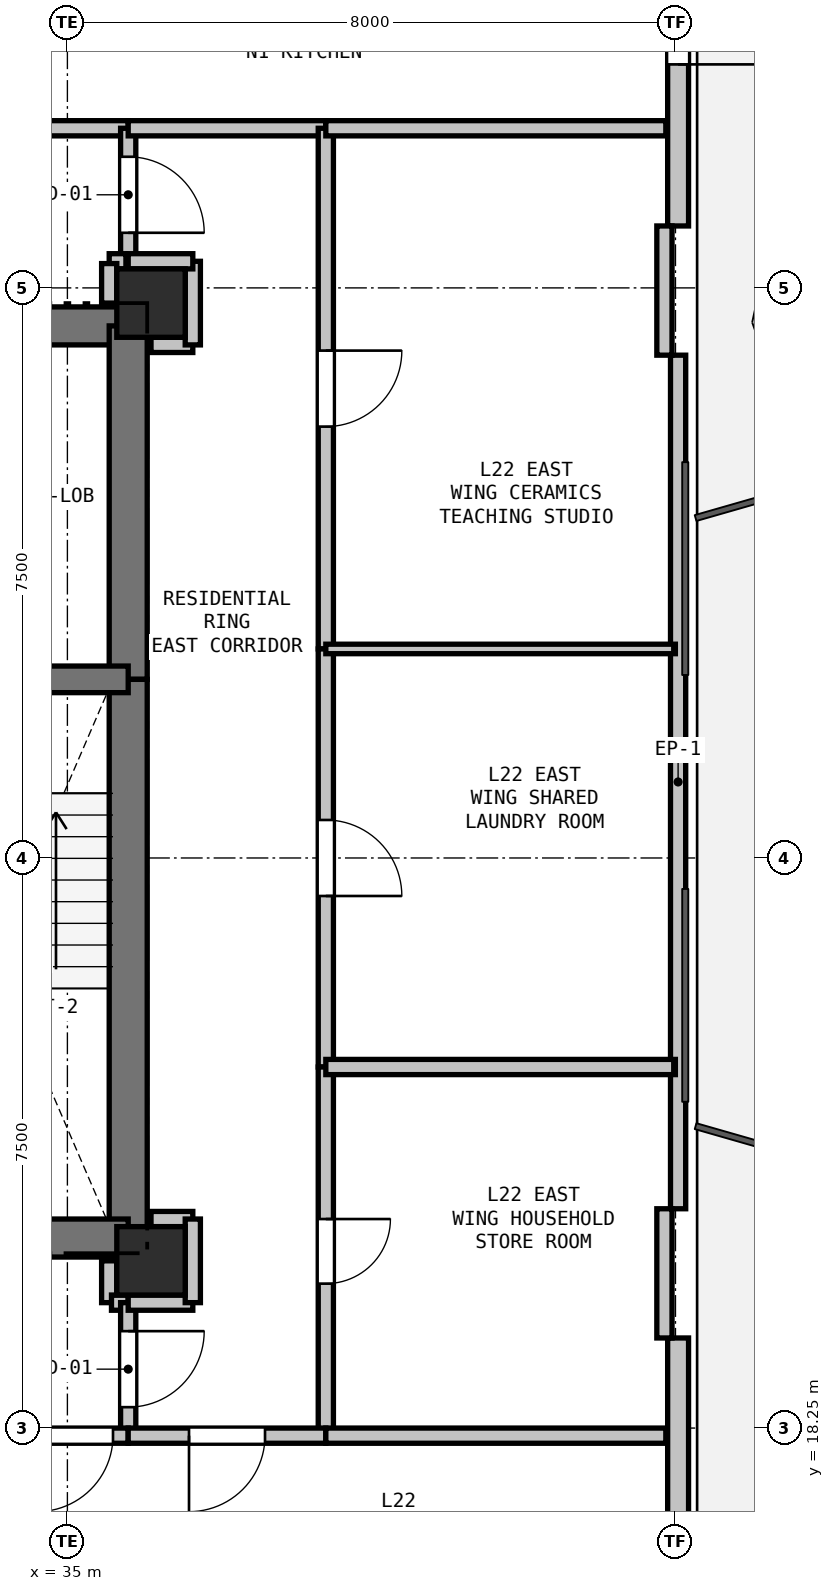
"""IFC4 building model, lengths in metres.
Left out: names, types, materials, properties, quantities, classifications, styles, units other than length and angle.
Written with IfcOpenShell. Run it as: python <this file> out.ifc"""

import sys

from ifc_helpers import new_model, si_unit, direction, frame, frame_2d, origin, origin_2d, place, context, subcontext, project, spatial, rectangle, extrude, element, fill, save


model = new_model("IFC4")
c1 = context("Model", 3, precision=1e-05, world=origin(), true_north=direction((0.0, 1.0)))
c2 = subcontext(c1, "Body", "Model", "MODEL_VIEW")
j1 = project(units=[si_unit("LENGTHUNIT", "METRE"), si_unit("PLANEANGLEUNIT", "RADIAN")], contexts=[c1])
p1 = place(None, origin())
s1 = spatial("IfcSite", under=j1, at=p1, CompositionType="ELEMENT")
p2 = place(p1, origin())
s2 = spatial("IfcBuilding", under=s1, at=p2, CompositionType="ELEMENT")
p3 = place(p2, frame((0.0, 0.0, 83.4)))
s3 = spatial("IfcBuildingStorey", under=s2, at=p3, CompositionType="ELEMENT", Elevation=83.4)
for number, where, z_axis, x_axis in (
    (1, (36.1, 33.05, 0.0), (0.0, 0.0, 1.0), (1.0, 0.0, 0.0)),
    (2, (36.1, 20.45, 0.0), (0.0, 0.0, 1.0), (1.0, 0.0, 0.0)),
):
    element("IfcColumn", number, at=place(p3, frame(where, z_axis=z_axis, x_axis=x_axis)), inside=s3, PredefinedType="COLUMN", context=c2, shape_type="SweptSolid", body=[
        extrude(rectangle(XDim=0.9, YDim=0.9, at=origin_2d()), origin(), (0.0, 0.0, 1.0), 3.3),
    ])
p4 = place(p3, frame((43.035, 45.994, 0.0), z_axis=(0.0, 0.0, 1.0), x_axis=(0.0, -1.0, 0.0)))
e3 = element("IfcWall", 3, at=p4, inside=s3, PredefinedType="SOLIDWALL", context=c2, shape_type="SweptSolid", body=[
    extrude(rectangle(XDim=11.93, YDim=0.275, at=frame_2d((5.965, 0.0))), origin(), (0.0, 0.0, 1.0), 2.67),
])
p5 = place(p4, frame((8.704, 0.0, 0.0)))
e4 = element("IfcOpeningElement", 4, at=p5, cuts=e3, PredefinedType="OPENING", context=c2, shape_type="SweptSolid", body=[
    extrude(rectangle(XDim=1.1, YDim=2.1, at=frame_2d((0.55, 1.05))), frame((0.0, 0.147, 0.0), z_axis=(0.0, -1.0, 0.0), x_axis=(1.0, 0.0, 0.0)), (0.0, 0.0, 1.0), 0.295),
])
p6 = place(p3, frame((43.035, 32.365, 0.0), z_axis=(0.0, 0.0, 1.0), x_axis=(0.0, -1.0, 0.0)))
e5 = element("IfcWall", 5, at=p6, inside=s3, PredefinedType="PARAPET", context=c2, shape_type="SweptSolid", body=[
    extrude(rectangle(XDim=11.229, YDim=0.2, at=frame_2d((5.615, 0.0))), origin(), (0.0, 0.0, 1.0), 0.2),
])
p7 = place(p3, frame((43.035, 19.435, 0.0), z_axis=(0.0, 0.0, 1.0), x_axis=(0.0, -1.0, 0.0)))
e6 = element("IfcWall", 6, at=p7, inside=s3, PredefinedType="SOLIDWALL", context=c2, shape_type="SweptSolid", body=[
    extrude(rectangle(XDim=11.93, YDim=0.275, at=frame_2d((5.965, 0.0))), origin(), (0.0, 0.0, 1.0), 2.67),
])
p8 = place(p7, frame((9.726, 0.0, 0.9)))
e7 = element("IfcOpeningElement", 7, at=p8, cuts=e6, PredefinedType="OPENING", context=c2, shape_type="SweptSolid", body=[
    extrude(rectangle(XDim=1.2, YDim=1.4, at=frame_2d((0.6, 0.7))), frame((0.0, 0.147, 0.0), z_axis=(0.0, -1.0, 0.0), x_axis=(1.0, 0.0, 0.0)), (0.0, 0.0, 1.0), 0.295),
])
for number, where, z_axis, x_axis in (
    (8, (42.854, 34.065, 0.0), (0.0, 0.0, 1.0), (0.0, -1.0, 0.0)),
    (9, (42.854, 21.135, 0.0), (0.0, 0.0, 1.0), (0.0, -1.0, 0.0)),
):
    element("IfcWall", number, at=place(p3, frame(where, z_axis=z_axis, x_axis=x_axis)), inside=s3, PredefinedType="PARAPET", context=c2, shape_type="SweptSolid", body=[
        extrude(rectangle(XDim=1.7, YDim=0.2, at=frame_2d((0.85, 0.0))), origin(), (0.0, 0.0, 1.0), 2.67),
    ])
p9 = place(p3, frame((32.35, 32.75, 0.0), z_axis=(0.0, 0.0, 1.0), x_axis=(1.0, 0.0, 0.0)))
e10 = element("IfcWall", 10, at=p9, inside=s3, PredefinedType="SHEAR", context=c2, shape_type="SweptSolid", body=[
    extrude(rectangle(XDim=3.45, YDim=0.5, at=frame_2d((1.725, 0.0))), origin(), (0.0, 0.0, 1.0), 3.05),
])
p10 = place(p9, frame((0.65, 0.0, 0.0)))
e11 = element("IfcOpeningElement", 11, at=p10, cuts=e10, PredefinedType="OPENING", context=c2, shape_type="SweptSolid", body=[
    extrude(rectangle(XDim=1.15, YDim=2.15, at=frame_2d((0.575, 1.075))), frame((0.0, 0.26, 0.0), z_axis=(0.0, -1.0, 0.0), x_axis=(1.0, 0.0, 0.0)), (0.0, 0.0, 1.0), 0.52),
])
p11 = place(p3, frame((35.8, 32.75, 0.0), z_axis=(0.0, 0.0, 1.0), x_axis=(0.0, -1.0, 0.0)))
e12 = element("IfcWall", 12, at=p11, inside=s3, PredefinedType="SHEAR", context=c2, shape_type="SweptSolid", body=[
    extrude(rectangle(XDim=4.65, YDim=0.5, at=frame_2d((2.325, 0.0))), origin(), (0.0, 0.0, 1.0), 3.05),
])
p12 = place(p3, frame((35.8, 28.1, 0.0), z_axis=(0.0, 0.0, 1.0), x_axis=(0.0, -1.0, 0.0)))
e13 = element("IfcWall", 13, at=p12, inside=s3, PredefinedType="SHEAR", context=c2, shape_type="SweptSolid", body=[
    extrude(rectangle(XDim=7.35, YDim=0.5, at=frame_2d((3.675, 0.0))), origin(), (0.0, 0.0, 1.0), 3.05),
])
p13 = place(p3, frame((35.8, 20.75, 0.0), z_axis=(0.0, 0.0, 1.0), x_axis=(-1.0, 0.0, 0.0)))
e14 = element("IfcWall", 14, at=p13, inside=s3, PredefinedType="SHEAR", context=c2, shape_type="SweptSolid", body=[
    extrude(rectangle(XDim=3.45, YDim=0.5, at=frame_2d((1.725, 0.0))), origin(), (0.0, 0.0, 1.0), 3.05),
])
p14 = place(p3, frame((32.35, 28.1, 0.0), z_axis=(0.0, 0.0, 1.0), x_axis=(1.0, 0.0, 0.0)))
e15 = element("IfcWall", 15, at=p14, inside=s3, PredefinedType="SHEAR", context=c2, shape_type="SweptSolid", body=[
    extrude(rectangle(XDim=3.45, YDim=0.35, at=frame_2d((1.725, 0.0))), origin(), (0.0, 0.0, 1.0), 3.05),
])
p15 = place(p14, frame((1.15, 0.0, 0.0)))
e16 = element("IfcOpeningElement", 16, at=p15, cuts=e15, PredefinedType="OPENING", context=c2, shape_type="SweptSolid", body=[
    extrude(rectangle(XDim=1.15, YDim=2.15, at=frame_2d((0.575, 1.075))), frame((0.0, 0.185, 0.0), z_axis=(0.0, -1.0, 0.0), x_axis=(1.0, 0.0, 0.0)), (0.0, 0.0, 1.0), 0.37),
])
p16 = place(p3, frame((35.55, 20.45, 0.0), z_axis=(0.0, 0.0, 1.0), x_axis=(0.0, -1.0, 0.0)))
e17 = element("IfcWall", 17, at=p16, inside=s3, PredefinedType="PARTITIONING", context=c2, shape_type="SweptSolid", body=[
    extrude(rectangle(XDim=0.55, YDim=0.2, at=frame_2d((0.275, 0.0))), origin(), (0.0, 0.0, 1.0), 2.498),
])
p17 = place(p3, frame((35.58, 19.9, 0.0), z_axis=(0.0, 0.0, 1.0), x_axis=(1.0, 0.0, 0.0)))
e18 = element("IfcWall", 18, at=p17, inside=s3, PredefinedType="PARTITIONING", context=c2, shape_type="SweptSolid", body=[
    extrude(rectangle(XDim=0.22, YDim=0.2, at=frame_2d((0.11, 0.0))), origin(), (0.0, 0.0, 1.0), 3.05),
])
p18 = place(p3, frame((35.8, 19.9, 0.0), z_axis=(0.0, 0.0, 1.0), x_axis=(0.0, -1.0, 0.0)))
e19 = element("IfcWall", 19, at=p18, inside=s3, PredefinedType="PARTITIONING", context=c2, shape_type="SweptSolid", body=[
    extrude(rectangle(XDim=1.75, YDim=0.2, at=frame_2d((0.875, 0.0))), origin(), (0.0, 0.0, 1.0), 3.05),
])
p19 = place(p18, frame((0.375, 0.0, 0.0)))
e20 = element("IfcOpeningElement", 20, at=p19, cuts=e19, PredefinedType="OPENING", context=c2, shape_type="SweptSolid", body=[
    extrude(rectangle(XDim=1.0, YDim=2.15, at=frame_2d((0.5, 1.075))), frame((0.0, 0.11, 0.0), z_axis=(0.0, -1.0, 0.0), x_axis=(1.0, 0.0, 0.0)), (0.0, 0.0, 1.0), 0.22),
])
p20 = place(p3, frame((35.8, 18.15, 0.0), z_axis=(0.0, 0.0, 1.0), x_axis=(-1.0, 0.0, 0.0)))
e21 = element("IfcWall", 21, at=p20, inside=s3, PredefinedType="PARTITIONING", context=c2, shape_type="SweptSolid", body=[
    extrude(rectangle(XDim=1.4, YDim=0.2, at=frame_2d((0.7, 0.0))), origin(), (0.0, 0.0, 1.0), 3.05),
])
p21 = place(p20, frame((0.2, 0.0, 0.0)))
e22 = element("IfcOpeningElement", 22, at=p21, cuts=e21, PredefinedType="OPENING", context=c2, shape_type="SweptSolid", body=[
    extrude(rectangle(XDim=1.0, YDim=2.15, at=frame_2d((0.5, 1.075))), frame((0.0, 0.11, 0.0), z_axis=(0.0, -1.0, 0.0), x_axis=(1.0, 0.0, 0.0)), (0.0, 0.0, 1.0), 0.22),
])
p22 = place(p3, frame((33.2, 35.35, 0.0), z_axis=(0.0, 0.0, 1.0), x_axis=(1.0, 0.0, 0.0)))
e23 = element("IfcWall", 23, at=p22, inside=s3, PredefinedType="PARTITIONING", context=c2, shape_type="SweptSolid", body=[
    extrude(rectangle(XDim=2.6, YDim=0.2, at=frame_2d((1.3, 0.0))), origin(), (0.0, 0.0, 1.0), 3.05),
])
p23 = place(p3, frame((35.8, 35.35, 0.0), z_axis=(0.0, 0.0, 1.0), x_axis=(0.0, -1.0, 0.0)))
e24 = element("IfcWall", 24, at=p23, inside=s3, PredefinedType="PARTITIONING", context=c2, shape_type="SweptSolid", body=[
    extrude(rectangle(XDim=1.75, YDim=0.2, at=frame_2d((0.875, 0.0))), origin(), (0.0, 0.0, 1.0), 3.05),
])
p24 = place(p23, frame((0.375, 0.0, 0.0)))
e25 = element("IfcOpeningElement", 25, at=p24, cuts=e24, PredefinedType="OPENING", context=c2, shape_type="SweptSolid", body=[
    extrude(rectangle(XDim=1.0, YDim=2.15, at=frame_2d((0.5, 1.075))), frame((0.0, 0.11, 0.0), z_axis=(0.0, -1.0, 0.0), x_axis=(1.0, 0.0, 0.0)), (0.0, 0.0, 1.0), 0.22),
])
p25 = place(p3, frame((35.77, 33.6, 0.0), z_axis=(0.0, 0.0, 1.0), x_axis=(-1.0, 0.0, 0.0)))
e26 = element("IfcWall", 26, at=p25, inside=s3, PredefinedType="PARTITIONING", context=c2, shape_type="SweptSolid", body=[
    extrude(rectangle(XDim=0.22, YDim=0.2, at=frame_2d((0.11, 0.0))), origin(), (0.0, 0.0, 1.0), 3.05),
])
p26 = place(p3, frame((35.55, 33.57, 0.0), z_axis=(0.0, 0.0, 1.0), x_axis=(0.0, -1.0, 0.0)))
e27 = element("IfcWall", 27, at=p26, inside=s3, PredefinedType="PARTITIONING", context=c2, shape_type="SweptSolid", body=[
    extrude(rectangle(XDim=0.52, YDim=0.2, at=frame_2d((0.26, 0.0))), origin(), (0.0, 0.0, 1.0), 2.498),
])
for number, where, z_axis, x_axis in (
    (28, (36.65, 21.0, 0.0), (0.0, 0.0, 1.0), (-1.0, 0.0, 0.0)),
    (29, (36.1, 32.5, 0.0), (0.0, 0.0, 1.0), (1.0, 0.0, 0.0)),
):
    element("IfcWall", number, at=place(p3, frame(where, z_axis=z_axis, x_axis=x_axis)), inside=s3, PredefinedType="PARTITIONING", context=c2, shape_type="SweptSolid", body=[
        extrude(rectangle(XDim=0.55, YDim=0.2, at=frame_2d((0.275, 0.0))), origin(), (0.0, 0.0, 1.0), 2.498),
    ])
p27 = place(p3, frame((36.65, 32.5, 0.0), z_axis=(0.0, 0.0, 1.0), x_axis=(0.0, 1.0, 0.0)))
e30 = element("IfcWall", 30, at=p27, inside=s3, PredefinedType="PARTITIONING", context=c2, shape_type="SweptSolid", body=[
    extrude(rectangle(XDim=1.1, YDim=0.2, at=frame_2d((0.55, 0.0))), origin(), (0.0, 0.0, 1.0), 2.423),
])
p28 = place(p3, frame((36.65, 33.6, 0.0), z_axis=(0.0, 0.0, 1.0), x_axis=(-1.0, 0.0, 0.0)))
e31 = element("IfcWall", 31, at=p28, inside=s3, PredefinedType="PARTITIONING", context=c2, shape_type="SweptSolid", body=[
    extrude(rectangle(XDim=0.85, YDim=0.2, at=frame_2d((0.425, 0.0))), origin(), (0.0, 0.0, 1.0), 2.423),
])
p29 = place(p3, frame((35.8, 35.35, 0.0), z_axis=(0.0, 0.0, 1.0), x_axis=(1.0, 0.0, 0.0)))
e32 = element("IfcWall", 32, at=p29, inside=s3, PredefinedType="PARTITIONING", context=c2, shape_type="SweptSolid", body=[
    extrude(rectangle(XDim=2.6, YDim=0.2, at=frame_2d((1.3, 0.0))), origin(), (0.0, 0.0, 1.0), 2.423),
])
p30 = place(p3, frame((38.4, 35.35, 0.0), z_axis=(0.0, 0.0, 1.0), x_axis=(0.0, -1.0, 0.0)))
e33 = element("IfcWall", 33, at=p30, inside=s3, PredefinedType="PARTITIONING", context=c2, shape_type="SweptSolid", body=[
    extrude(rectangle(XDim=6.85, YDim=0.2, at=frame_2d((3.425, 0.0))), origin(), (0.0, 0.0, 1.0), 3.05),
])
p31 = place(p30, frame((2.925, 0.0, 0.0)))
e34 = element("IfcOpeningElement", 34, at=p31, cuts=e33, PredefinedType="OPENING", context=c2, shape_type="SweptSolid", body=[
    extrude(rectangle(XDim=1.0, YDim=2.15, at=frame_2d((0.5, 1.075))), frame((0.0, 0.11, 0.0), z_axis=(0.0, -1.0, 0.0), x_axis=(1.0, 0.0, 0.0)), (0.0, 0.0, 1.0), 0.22),
])
p32 = place(p3, frame((38.4, 28.5, 0.0), z_axis=(0.0, 0.0, 1.0), x_axis=(0.0, -1.0, 0.0)))
e35 = element("IfcWall", 35, at=p32, inside=s3, PredefinedType="PARTITIONING", context=c2, shape_type="SweptSolid", body=[
    extrude(rectangle(XDim=5.5, YDim=0.2, at=frame_2d((2.75, 0.0))), origin(), (0.0, 0.0, 1.0), 3.05),
])
p33 = place(p32, frame((2.25, 0.0, 0.0)))
e36 = element("IfcOpeningElement", 36, at=p33, cuts=e35, PredefinedType="OPENING", context=c2, shape_type="SweptSolid", body=[
    extrude(rectangle(XDim=1.0, YDim=2.15, at=frame_2d((0.5, 1.075))), frame((0.0, 0.11, 0.0), z_axis=(0.0, -1.0, 0.0), x_axis=(1.0, 0.0, 0.0)), (0.0, 0.0, 1.0), 0.22),
])
p34 = place(p3, frame((38.4, 23.0, 0.0), z_axis=(0.0, 0.0, 1.0), x_axis=(0.0, -1.0, 0.0)))
e37 = element("IfcWall", 37, at=p34, inside=s3, PredefinedType="PARTITIONING", context=c2, shape_type="SweptSolid", body=[
    extrude(rectangle(XDim=4.85, YDim=0.2, at=frame_2d((2.425, 0.0))), origin(), (0.0, 0.0, 1.0), 3.05),
])
p35 = place(p34, frame((2.0, 0.0, 0.0)))
e38 = element("IfcOpeningElement", 38, at=p35, cuts=e37, PredefinedType="OPENING", context=c2, shape_type="SweptSolid", body=[
    extrude(rectangle(XDim=0.85, YDim=2.1, at=frame_2d((0.425, 1.05))), frame((0.0, 0.11, 0.0), z_axis=(0.0, -1.0, 0.0), x_axis=(1.0, 0.0, 0.0)), (0.0, 0.0, 1.0), 0.22),
])
p36 = place(p3, frame((38.4, 18.15, 0.0), z_axis=(0.0, 0.0, 1.0), x_axis=(-1.0, 0.0, 0.0)))
e39 = element("IfcWall", 39, at=p36, inside=s3, PredefinedType="PARTITIONING", context=c2, shape_type="SweptSolid", body=[
    extrude(rectangle(XDim=2.6, YDim=0.2, at=frame_2d((1.3, 0.0))), origin(), (0.0, 0.0, 1.0), 2.423),
])
p37 = place(p36, frame((0.8, 0.0, 0.0)))
e40 = element("IfcOpeningElement", 40, at=p37, cuts=e39, PredefinedType="OPENING", context=c2, shape_type="SweptSolid", body=[
    extrude(rectangle(XDim=1.0, YDim=2.15, at=frame_2d((0.5, 1.075))), frame((0.0, 0.11, 0.0), z_axis=(0.0, -1.0, 0.0), x_axis=(1.0, 0.0, 0.0)), (0.0, 0.0, 1.0), 0.22),
])
p38 = place(p3, frame((35.8, 19.9, 0.0), z_axis=(0.0, 0.0, 1.0), x_axis=(1.0, 0.0, 0.0)))
e41 = element("IfcWall", 41, at=p38, inside=s3, PredefinedType="PARTITIONING", context=c2, shape_type="SweptSolid", body=[
    extrude(rectangle(XDim=0.85, YDim=0.2, at=frame_2d((0.425, 0.0))), origin(), (0.0, 0.0, 1.0), 2.423),
])
p39 = place(p3, frame((36.65, 19.9, 0.0), z_axis=(0.0, 0.0, 1.0), x_axis=(0.0, 1.0, 0.0)))
e42 = element("IfcWall", 42, at=p39, inside=s3, PredefinedType="PARTITIONING", context=c2, shape_type="SweptSolid", body=[
    extrude(rectangle(XDim=1.1, YDim=0.2, at=frame_2d((0.55, 0.0))), origin(), (0.0, 0.0, 1.0), 3.05),
])
for number, where, z_axis, x_axis in (
    (43, (42.873, 35.35, 0.0), (0.0, 0.0, 1.0), (-1.0, 0.0, 0.0)),
    (44, (38.4, 18.15, 0.0), (0.0, 0.0, 1.0), (1.0, 0.0, 0.0)),
):
    element("IfcWall", number, at=place(p3, frame(where, z_axis=z_axis, x_axis=x_axis)), inside=s3, PredefinedType="PARTITIONING", context=c2, shape_type="SweptSolid", body=[
        extrude(rectangle(XDim=4.473, YDim=0.2, at=frame_2d((2.237, 0.0))), origin(), (0.0, 0.0, 1.0), 2.365),
    ])
p40 = place(p3, frame((42.999, 28.5, 0.0), z_axis=(0.0, 0.0, 1.0), x_axis=(-1.0, 0.0, 0.0)))
e45 = element("IfcWall", 45, at=p40, inside=s3, PredefinedType="PARTITIONING", context=c2, shape_type="SweptSolid", body=[
    extrude(rectangle(XDim=4.599, YDim=0.125, at=frame_2d((2.299, 0.0))), origin(), (0.0, 0.0, 1.0), 2.365),
])
p41 = place(p3, frame((42.999, 23.0, 0.0), z_axis=(0.0, 0.0, 1.0), x_axis=(-1.0, 0.0, 0.0)))
e46 = element("IfcWall", 46, at=p41, inside=s3, PredefinedType="PARTITIONING", context=c2, shape_type="SweptSolid", body=[
    extrude(rectangle(XDim=4.599, YDim=0.2, at=frame_2d((2.299, 0.0))), origin(), (0.0, 0.0, 1.0), 2.365),
])
p42 = place(p5, origin())
e47 = element("IfcDoor", 47, at=p42, inside=s3, OperationType="SINGLE_SWING_RIGHT", PredefinedType="DOOR", context=c2, shape_type="SweptSolid", body=[
    extrude(rectangle(XDim=1.1, YDim=2.1, at=frame_2d((0.55, 1.05))), frame((0.0, 0.025, 0.0), z_axis=(0.0, -1.0, 0.0), x_axis=(1.0, 0.0, 0.0)), (0.0, 0.0, 1.0), 0.05),
])
fill(e4, e47)
p43 = place(p19, origin())
e48 = element("IfcDoor", 48, at=p43, inside=s3, OperationType="SINGLE_SWING_LEFT", PredefinedType="DOOR", context=c2, shape_type="SweptSolid", body=[
    extrude(rectangle(XDim=1.0, YDim=2.15, at=frame_2d((0.5, 1.075))), frame((0.0, 0.025, 0.0), z_axis=(0.0, -1.0, 0.0), x_axis=(1.0, 0.0, 0.0)), (0.0, 0.0, 1.0), 0.05),
])
fill(e20, e48)
p44 = place(p24, origin())
e49 = element("IfcDoor", 49, at=p44, inside=s3, OperationType="SINGLE_SWING_RIGHT", PredefinedType="DOOR", context=c2, shape_type="SweptSolid", body=[
    extrude(rectangle(XDim=1.0, YDim=2.15, at=frame_2d((0.5, 1.075))), frame((0.0, 0.025, 0.0), z_axis=(0.0, -1.0, 0.0), x_axis=(1.0, 0.0, 0.0)), (0.0, 0.0, 1.0), 0.05),
])
fill(e25, e49)
p45 = place(p21, origin())
e50 = element("IfcDoor", 50, at=p45, inside=s3, OperationType="SINGLE_SWING_RIGHT", PredefinedType="DOOR", context=c2, shape_type="SweptSolid", body=[
    extrude(rectangle(XDim=1.0, YDim=2.15, at=frame_2d((0.5, 1.075))), frame((0.0, 0.025, 0.0), z_axis=(0.0, -1.0, 0.0), x_axis=(1.0, 0.0, 0.0)), (0.0, 0.0, 1.0), 0.05),
])
fill(e22, e50)
p46 = place(p37, origin())
e51 = element("IfcDoor", 51, at=p46, inside=s3, OperationType="SINGLE_SWING_RIGHT", PredefinedType="DOOR", context=c2, shape_type="SweptSolid", body=[
    extrude(rectangle(XDim=1.0, YDim=2.15, at=frame_2d((0.5, 1.075))), frame((0.0, 0.025, 0.0), z_axis=(0.0, -1.0, 0.0), x_axis=(1.0, 0.0, 0.0)), (0.0, 0.0, 1.0), 0.05),
])
fill(e40, e51)
p47 = place(p31, origin())
e52 = element("IfcDoor", 52, at=p47, inside=s3, OperationType="SINGLE_SWING_LEFT", PredefinedType="DOOR", context=c2, shape_type="SweptSolid", body=[
    extrude(rectangle(XDim=1.0, YDim=2.15, at=frame_2d((0.5, 1.075))), frame((0.0, 0.025, 0.0), z_axis=(0.0, -1.0, 0.0), x_axis=(1.0, 0.0, 0.0)), (0.0, 0.0, 1.0), 0.05),
])
fill(e34, e52)
p48 = place(p33, origin())
e53 = element("IfcDoor", 53, at=p48, inside=s3, OperationType="SINGLE_SWING_RIGHT", PredefinedType="DOOR", context=c2, shape_type="SweptSolid", body=[
    extrude(rectangle(XDim=1.0, YDim=2.15, at=frame_2d((0.5, 1.075))), frame((0.0, 0.025, 0.0), z_axis=(0.0, -1.0, 0.0), x_axis=(1.0, 0.0, 0.0)), (0.0, 0.0, 1.0), 0.05),
])
fill(e36, e53)
p49 = place(p35, origin())
e54 = element("IfcDoor", 54, at=p49, inside=s3, OperationType="SINGLE_SWING_LEFT", PredefinedType="DOOR", context=c2, shape_type="SweptSolid", body=[
    extrude(rectangle(XDim=0.85, YDim=2.1, at=frame_2d((0.425, 1.05))), frame((0.0, 0.025, 0.0), z_axis=(0.0, -1.0, 0.0), x_axis=(1.0, 0.0, 0.0)), (0.0, 0.0, 1.0), 0.05),
])
fill(e38, e54)
save(model, sys.argv[1])
